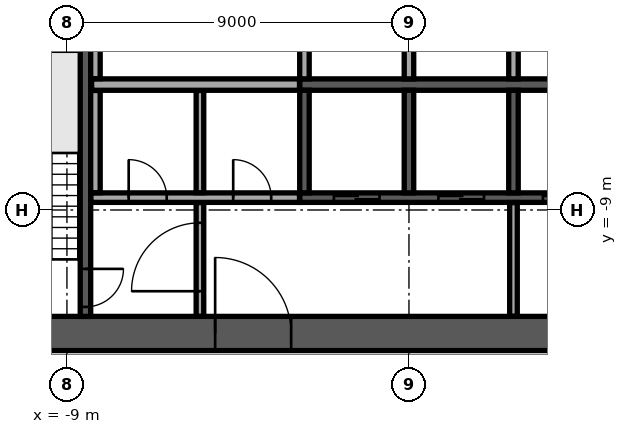
"""IFC4 building model, lengths in metres.
Left out: names, types, materials, properties, quantities, classifications, styles, units other than length and angle.
Written with IfcOpenShell. Run it as: python <this file> out.ifc"""

import sys

from ifc_helpers import new_model, si_unit, direction, frame, frame_2d, origin, place, context, subcontext, project, spatial, rectangle, extrude, element, fill, save


model = new_model("IFC4")
c1 = context("Model", 3, precision=1e-05, world=origin(), true_north=direction((0.0, 1.0)))
c2 = subcontext(c1, "Body", "Model", "MODEL_VIEW")
j1 = project(units=[si_unit("LENGTHUNIT", "METRE"), si_unit("PLANEANGLEUNIT", "RADIAN")], contexts=[c1])
p1 = place(None, origin())
s1 = spatial("IfcSite", under=j1, at=p1, CompositionType="ELEMENT")
p2 = place(p1, origin())
s2 = spatial("IfcBuilding", under=s1, at=p2, CompositionType="ELEMENT")
p3 = place(p2, frame((0.0, 0.0, 197.3)))
s3 = spatial("IfcBuildingStorey", under=s2, at=p3, CompositionType="ELEMENT", Elevation=197.3)
p4 = place(p3, frame((-12.7, -12.25, 0.0), z_axis=(0.0, 0.0, 1.0), x_axis=(1.0, 0.0, 0.0)))
e1 = element("IfcWall", 1, at=p4, inside=s3, PredefinedType="SHEAR", context=c2, shape_type="SweptSolid", body=[
    extrude(rectangle(XDim=25.4, YDim=0.9, at=frame_2d((12.7, 0.0))), origin(), (0.0, 0.0, 1.0), 3.62),
])
p5 = place(p4, frame((7.6, 0.0, 0.0)))
e2 = element("IfcOpeningElement", 2, at=p5, cuts=e1, PredefinedType="OPENING", context=c2, shape_type="SweptSolid", body=[
    extrude(rectangle(XDim=2.0, YDim=2.1, at=frame_2d((1.0, 1.05))), frame((0.0, 0.46, 0.0), z_axis=(0.0, -1.0, 0.0), x_axis=(1.0, 0.0, 0.0)), (0.0, 0.0, 1.0), 0.92),
])
p6 = place(p4, frame((17.725, 0.0, 0.0)))
e3 = element("IfcOpeningElement", 3, at=p6, cuts=e1, PredefinedType="OPENING", context=c2, shape_type="SweptSolid", body=[
    extrude(rectangle(XDim=1.2, YDim=2.1, at=frame_2d((0.6, 1.05))), frame((0.0, 0.46, 0.0), z_axis=(0.0, -1.0, 0.0), x_axis=(1.0, 0.0, 0.0)), (0.0, 0.0, 1.0), 0.92),
])
p7 = place(p4, frame((1.875, 0.0, 0.0)))
e4 = element("IfcOpeningElement", 4, at=p7, cuts=e1, PredefinedType="OPENING", context=c2, shape_type="SweptSolid", body=[
    extrude(rectangle(XDim=1.2, YDim=2.1, at=frame_2d((0.6, 1.05))), frame((0.0, 0.46, 0.0), z_axis=(0.0, -1.0, 0.0), x_axis=(1.0, 0.0, 0.0)), (0.0, 0.0, 1.0), 0.92),
])
p8 = place(p4, frame((22.325, 0.0, 0.0)))
e5 = element("IfcOpeningElement", 5, at=p8, cuts=e1, PredefinedType="OPENING", context=c2, shape_type="SweptSolid", body=[
    extrude(rectangle(XDim=1.2, YDim=2.1, at=frame_2d((0.6, 1.05))), frame((0.0, 0.46, 0.0), z_axis=(0.0, -1.0, 0.0), x_axis=(1.0, 0.0, 0.0)), (0.0, 0.0, 1.0), 0.92),
])
p9 = place(p3, frame((-2.875, -5.7, 0.0), z_axis=(0.0, 0.0, 1.0), x_axis=(1.0, 0.0, 0.0)))
e6 = element("IfcWall", 6, at=p9, inside=s3, PredefinedType="SOLIDWALL", context=c2, shape_type="SweptSolid", body=[
    extrude(rectangle(XDim=11.25, YDim=0.3, at=frame_2d((5.625, 0.0))), origin(), (0.0, 0.0, 1.0), 3.62),
])
for number, where, z_axis, x_axis in (
    (7, (-2.75, -5.55, 0.0), (0.0, 0.0, 1.0), (0.0, 1.0, 0.0)),
    (8, (0.0, -5.55, 0.0), (0.0, 0.0, 1.0), (0.0, 1.0, 0.0)),
    (9, (2.75, -5.55, 0.0), (0.0, 0.0, 1.0), (0.0, 1.0, 0.0)),
):
    element("IfcWall", number, at=place(p3, frame(where, z_axis=z_axis, x_axis=x_axis)), inside=s3, PredefinedType="SOLIDWALL", context=c2, shape_type="SweptSolid", body=[
        extrude(rectangle(XDim=2.7, YDim=0.25, at=frame_2d((1.35, 0.0))), origin(), (0.0, 0.0, 1.0), 3.62),
    ])
p10 = place(p3, frame((-2.875, -8.675, 0.0), z_axis=(0.0, 0.0, 1.0), x_axis=(1.0, 0.0, 0.0)))
e10 = element("IfcWall", 10, at=p10, inside=s3, PredefinedType="SOLIDWALL", context=c2, shape_type="SweptSolid", body=[
    extrude(rectangle(XDim=11.25, YDim=0.25, at=frame_2d((5.625, 0.0))), origin(), (0.0, 0.0, 1.0), 3.62),
])
p11 = place(p10, frame((0.9, 0.0, 0.0)))
e11 = element("IfcOpeningElement", 11, at=p11, cuts=e10, PredefinedType="OPENING", context=c2, shape_type="SweptSolid", body=[
    extrude(rectangle(XDim=1.2, YDim=2.1, at=frame_2d((0.6, 1.05))), frame((0.0, 0.135, 0.0), z_axis=(0.0, -1.0, 0.0), x_axis=(1.0, 0.0, 0.0)), (0.0, 0.0, 1.0), 0.27),
])
p12 = place(p10, frame((3.65, 0.0, 0.0)))
e12 = element("IfcOpeningElement", 12, at=p12, cuts=e10, PredefinedType="OPENING", context=c2, shape_type="SweptSolid", body=[
    extrude(rectangle(XDim=1.2, YDim=2.1, at=frame_2d((0.6, 1.05))), frame((0.0, 0.135, 0.0), z_axis=(0.0, -1.0, 0.0), x_axis=(1.0, 0.0, 0.0)), (0.0, 0.0, 1.0), 0.27),
])
p13 = place(p10, frame((6.4, 0.0, 0.0)))
e13 = element("IfcOpeningElement", 13, at=p13, cuts=e10, PredefinedType="OPENING", context=c2, shape_type="SweptSolid", body=[
    extrude(rectangle(XDim=1.2, YDim=2.1, at=frame_2d((0.6, 1.05))), frame((0.0, 0.135, 0.0), z_axis=(0.0, -1.0, 0.0), x_axis=(1.0, 0.0, 0.0)), (0.0, 0.0, 1.0), 0.27),
])
p14 = place(p10, frame((9.15, 0.0, 0.0)))
e14 = element("IfcOpeningElement", 14, at=p14, cuts=e10, PredefinedType="OPENING", context=c2, shape_type="SweptSolid", body=[
    extrude(rectangle(XDim=1.2, YDim=2.1, at=frame_2d((0.6, 1.05))), frame((0.0, 0.135, 0.0), z_axis=(0.0, -1.0, 0.0), x_axis=(1.0, 0.0, 0.0)), (0.0, 0.0, 1.0), 0.27),
])
for number, where, z_axis, x_axis in (
    (15, (-2.75, -8.55, 0.0), (0.0, 0.0, 1.0), (0.0, 1.0, 0.0)),
    (16, (0.0, -8.55, 0.0), (0.0, 0.0, 1.0), (0.0, 1.0, 0.0)),
    (17, (2.75, -8.55, 0.0), (0.0, 0.0, 1.0), (0.0, 1.0, 0.0)),
):
    element("IfcWall", number, at=place(p3, frame(where, z_axis=z_axis, x_axis=x_axis)), inside=s3, PredefinedType="SOLIDWALL", context=c2, shape_type="SweptSolid", body=[
        extrude(rectangle(XDim=2.7, YDim=0.25, at=frame_2d((1.35, 0.0))), origin(), (0.0, 0.0, 1.0), 3.62),
    ])
p15 = place(p3, frame((-8.512, -4.55, 0.0), z_axis=(0.0, 0.0, 1.0), x_axis=(0.0, -1.0, 0.0)))
e18 = element("IfcWall", 18, at=p15, inside=s3, PredefinedType="SOLIDWALL", context=c2, shape_type="SweptSolid", body=[
    extrude(rectangle(XDim=7.25, YDim=0.275, at=frame_2d((3.625, 0.0))), origin(), (0.0, 0.0, 1.0), 3.62),
])
p16 = place(p15, frame((6.0, 0.0, 0.0)))
e19 = element("IfcOpeningElement", 19, at=p16, cuts=e18, PredefinedType="OPENING", context=c2, shape_type="SweptSolid", body=[
    extrude(rectangle(XDim=1.0, YDim=2.1, at=frame_2d((0.5, 1.05))), frame((0.0, 0.147, 0.0), z_axis=(0.0, -1.0, 0.0), x_axis=(1.0, 0.0, 0.0)), (0.0, 0.0, 1.0), 0.295),
])
p17 = place(p3, frame((-5.5, -11.795, 0.0), z_axis=(0.0, 0.0, 1.0), x_axis=(0.0, 1.0, 0.0)))
e20 = element("IfcWall", 20, at=p17, inside=s3, PredefinedType="PARTITIONING", context=c2, shape_type="SweptSolid", body=[
    extrude(rectangle(XDim=2.99, YDim=0.2, at=frame_2d((1.495, 0.0))), origin(), (0.0, 0.0, 1.0), 3.62),
])
p18 = place(p17, frame((0.657, 0.0, 0.0)))
e21 = element("IfcOpeningElement", 21, at=p18, cuts=e20, PredefinedType="OPENING", context=c2, shape_type="SweptSolid", body=[
    extrude(rectangle(XDim=1.8, YDim=2.1, at=frame_2d((0.9, 1.05))), frame((0.0, 0.11, 0.0), z_axis=(0.0, -1.0, 0.0), x_axis=(1.0, 0.0, 0.0)), (0.0, 0.0, 1.0), 0.22),
])
p19 = place(p3, frame((2.75, -11.795, 0.0), z_axis=(0.0, 0.0, 1.0), x_axis=(0.0, 1.0, 0.0)))
e22 = element("IfcWall", 22, at=p19, inside=s3, PredefinedType="PARTITIONING", context=c2, shape_type="SweptSolid", body=[
    extrude(rectangle(XDim=2.99, YDim=0.2, at=frame_2d((1.495, 0.0))), origin(), (0.0, 0.0, 1.0), 3.62),
])
p20 = place(p3, frame((-8.37, -8.675, 0.0), z_axis=(0.0, 0.0, 1.0), x_axis=(1.0, 0.0, 0.0)))
e23 = element("IfcWall", 23, at=p20, inside=s3, PredefinedType="PARTITIONING", context=c2, shape_type="SweptSolid", body=[
    extrude(rectangle(XDim=5.49, YDim=0.25, at=frame_2d((2.745, 0.0))), origin(), (0.0, 0.0, 1.0), 3.62),
])
p21 = place(p20, frame((0.995, 0.0, 0.0)))
e24 = element("IfcOpeningElement", 24, at=p21, cuts=e23, PredefinedType="OPENING", context=c2, shape_type="SweptSolid", body=[
    extrude(rectangle(XDim=1.0, YDim=2.1, at=frame_2d((0.5, 1.05))), frame((0.0, 0.135, 0.0), z_axis=(0.0, -1.0, 0.0), x_axis=(1.0, 0.0, 0.0)), (0.0, 0.0, 1.0), 0.27),
])
p22 = place(p20, frame((3.745, 0.0, 0.0)))
e25 = element("IfcOpeningElement", 25, at=p22, cuts=e23, PredefinedType="OPENING", context=c2, shape_type="SweptSolid", body=[
    extrude(rectangle(XDim=1.0, YDim=2.1, at=frame_2d((0.5, 1.05))), frame((0.0, 0.135, 0.0), z_axis=(0.0, -1.0, 0.0), x_axis=(1.0, 0.0, 0.0)), (0.0, 0.0, 1.0), 0.27),
])
p23 = place(p3, frame((-8.25, -8.545, 0.0), z_axis=(0.0, 0.0, 1.0), x_axis=(0.0, 1.0, 0.0)))
e26 = element("IfcWall", 26, at=p23, inside=s3, PredefinedType="PARTITIONING", context=c2, shape_type="SweptSolid", body=[
    extrude(rectangle(XDim=2.69, YDim=0.25, at=frame_2d((1.345, 0.0))), origin(), (0.0, 0.0, 1.0), 3.62),
])
p24 = place(p3, frame((-5.5, -8.545, 0.0), z_axis=(0.0, 0.0, 1.0), x_axis=(0.0, 1.0, 0.0)))
e27 = element("IfcWall", 27, at=p24, inside=s3, PredefinedType="PARTITIONING", context=c2, shape_type="SweptSolid", body=[
    extrude(rectangle(XDim=2.69, YDim=0.2, at=frame_2d((1.345, 0.0))), origin(), (0.0, 0.0, 1.0), 3.62),
])
p25 = place(p3, frame((-8.35, -5.7, 0.0), z_axis=(0.0, 0.0, 1.0), x_axis=(1.0, 0.0, 0.0)))
e28 = element("IfcWall", 28, at=p25, inside=s3, PredefinedType="PARTITIONING", context=c2, shape_type="SweptSolid", body=[
    extrude(rectangle(XDim=5.47, YDim=0.3, at=frame_2d((2.735, 0.0))), origin(), (0.0, 0.0, 1.0), 3.62),
])
p26 = place(p3, frame((-8.25, -5.545, 0.0), z_axis=(0.0, 0.0, 1.0), x_axis=(0.0, 1.0, 0.0)))
e29 = element("IfcWall", 29, at=p26, inside=s3, PredefinedType="PARTITIONING", context=c2, shape_type="SweptSolid", body=[
    extrude(rectangle(XDim=2.69, YDim=0.25, at=frame_2d((1.345, 0.0))), origin(), (0.0, 0.0, 1.0), 3.62),
])
p27 = place(p3, frame((-35.02, -5.994, 0.0), z_axis=(0.0, 0.0, 1.0), x_axis=(0.682002361324, -0.731349970362, 0.0)))
e30 = element("IfcWall", 30, at=p27, inside=s3, PredefinedType="STANDARD", context=c2, shape_type="SweptSolid", body=[
    extrude(rectangle(XDim=39.0, YDim=0.6, at=frame_2d((19.5, 0.0))), origin(), (0.0, 0.0, 1.0), 3.62),
])
p28 = place(p27, frame((1.217, 0.0, 0.9)))
e31 = element("IfcOpeningElement", 31, at=p28, cuts=e30, PredefinedType="OPENING", context=c2, shape_type="SweptSolid", body=[
    extrude(rectangle(XDim=1.9, YDim=2.1, at=frame_2d((0.95, 1.05))), frame((0.0, 0.31, 0.0), z_axis=(0.0, -1.0, 0.0), x_axis=(1.0, 0.0, 0.0)), (0.0, 0.0, 1.0), 0.62),
])
p29 = place(p27, frame((5.55, 0.0, 0.9)))
e32 = element("IfcOpeningElement", 32, at=p29, cuts=e30, PredefinedType="OPENING", context=c2, shape_type="SweptSolid", body=[
    extrude(rectangle(XDim=1.9, YDim=2.1, at=frame_2d((0.95, 1.05))), frame((0.0, 0.31, 0.0), z_axis=(0.0, -1.0, 0.0), x_axis=(1.0, 0.0, 0.0)), (0.0, 0.0, 1.0), 0.62),
])
p30 = place(p27, frame((9.883, 0.0, 0.9)))
e33 = element("IfcOpeningElement", 33, at=p30, cuts=e30, PredefinedType="OPENING", context=c2, shape_type="SweptSolid", body=[
    extrude(rectangle(XDim=1.9, YDim=2.1, at=frame_2d((0.95, 1.05))), frame((0.0, 0.31, 0.0), z_axis=(0.0, -1.0, 0.0), x_axis=(1.0, 0.0, 0.0)), (0.0, 0.0, 1.0), 0.62),
])
p31 = place(p27, frame((14.217, 0.0, 0.9)))
e34 = element("IfcOpeningElement", 34, at=p31, cuts=e30, PredefinedType="OPENING", context=c2, shape_type="SweptSolid", body=[
    extrude(rectangle(XDim=1.9, YDim=2.1, at=frame_2d((0.95, 1.05))), frame((0.0, 0.31, 0.0), z_axis=(0.0, -1.0, 0.0), x_axis=(1.0, 0.0, 0.0)), (0.0, 0.0, 1.0), 0.62),
])
p32 = place(p27, frame((18.55, 0.0, 0.9)))
e35 = element("IfcOpeningElement", 35, at=p32, cuts=e30, PredefinedType="OPENING", context=c2, shape_type="SweptSolid", body=[
    extrude(rectangle(XDim=1.9, YDim=2.1, at=frame_2d((0.95, 1.05))), frame((0.0, 0.31, 0.0), z_axis=(0.0, -1.0, 0.0), x_axis=(1.0, 0.0, 0.0)), (0.0, 0.0, 1.0), 0.62),
])
p33 = place(p27, frame((22.883, 0.0, 0.9)))
e36 = element("IfcOpeningElement", 36, at=p33, cuts=e30, PredefinedType="OPENING", context=c2, shape_type="SweptSolid", body=[
    extrude(rectangle(XDim=1.9, YDim=2.1, at=frame_2d((0.95, 1.05))), frame((0.0, 0.31, 0.0), z_axis=(0.0, -1.0, 0.0), x_axis=(1.0, 0.0, 0.0)), (0.0, 0.0, 1.0), 0.62),
])
p34 = place(p27, frame((27.217, 0.0, 0.9)))
e37 = element("IfcOpeningElement", 37, at=p34, cuts=e30, PredefinedType="OPENING", context=c2, shape_type="SweptSolid", body=[
    extrude(rectangle(XDim=1.9, YDim=2.1, at=frame_2d((0.95, 1.05))), frame((0.0, 0.31, 0.0), z_axis=(0.0, -1.0, 0.0), x_axis=(1.0, 0.0, 0.0)), (0.0, 0.0, 1.0), 0.62),
])
p35 = place(p27, frame((31.55, 0.0, 0.9)))
e38 = element("IfcOpeningElement", 38, at=p35, cuts=e30, PredefinedType="OPENING", context=c2, shape_type="SweptSolid", body=[
    extrude(rectangle(XDim=1.9, YDim=2.1, at=frame_2d((0.95, 1.05))), frame((0.0, 0.31, 0.0), z_axis=(0.0, -1.0, 0.0), x_axis=(1.0, 0.0, 0.0)), (0.0, 0.0, 1.0), 0.62),
])
p36 = place(p27, frame((35.883, 0.0, 0.9)))
e39 = element("IfcOpeningElement", 39, at=p36, cuts=e30, PredefinedType="OPENING", context=c2, shape_type="SweptSolid", body=[
    extrude(rectangle(XDim=1.9, YDim=2.1, at=frame_2d((0.95, 1.05))), frame((0.0, 0.31, 0.0), z_axis=(0.0, -1.0, 0.0), x_axis=(1.0, 0.0, 0.0)), (0.0, 0.0, 1.0), 0.62),
])
p37 = place(p3, frame((-1.073, -34.773, 0.0), z_axis=(0.0, 0.0, 1.0), x_axis=(0.731351780381, 0.682000420333, 0.0)))
e40 = element("IfcWall", 40, at=p37, inside=s3, PredefinedType="STANDARD", context=c2, shape_type="SweptSolid", body=[
    extrude(rectangle(XDim=49.0, YDim=0.6, at=frame_2d((24.5, 0.0))), origin(), (0.0, 0.0, 1.0), 3.62),
])
p38 = place(p37, frame((1.227, 0.0, 0.9)))
e41 = element("IfcOpeningElement", 41, at=p38, cuts=e40, PredefinedType="OPENING", context=c2, shape_type="SweptSolid", body=[
    extrude(rectangle(XDim=2.0, YDim=2.1, at=frame_2d((1.0, 1.05))), frame((0.0, 0.31, 0.0), z_axis=(0.0, -1.0, 0.0), x_axis=(1.0, 0.0, 0.0)), (0.0, 0.0, 1.0), 0.62),
])
p39 = place(p37, frame((5.682, 0.0, 0.9)))
e42 = element("IfcOpeningElement", 42, at=p39, cuts=e40, PredefinedType="OPENING", context=c2, shape_type="SweptSolid", body=[
    extrude(rectangle(XDim=2.0, YDim=2.1, at=frame_2d((1.0, 1.05))), frame((0.0, 0.31, 0.0), z_axis=(0.0, -1.0, 0.0), x_axis=(1.0, 0.0, 0.0)), (0.0, 0.0, 1.0), 0.62),
])
p40 = place(p37, frame((14.591, 0.0, 0.9)))
e43 = element("IfcOpeningElement", 43, at=p40, cuts=e40, PredefinedType="OPENING", context=c2, shape_type="SweptSolid", body=[
    extrude(rectangle(XDim=2.0, YDim=2.1, at=frame_2d((1.0, 1.05))), frame((0.0, 0.31, 0.0), z_axis=(0.0, -1.0, 0.0), x_axis=(1.0, 0.0, 0.0)), (0.0, 0.0, 1.0), 0.62),
])
p41 = place(p37, frame((19.045, 0.0, 0.9)))
e44 = element("IfcOpeningElement", 44, at=p41, cuts=e40, PredefinedType="OPENING", context=c2, shape_type="SweptSolid", body=[
    extrude(rectangle(XDim=2.0, YDim=2.1, at=frame_2d((1.0, 1.05))), frame((0.0, 0.31, 0.0), z_axis=(0.0, -1.0, 0.0), x_axis=(1.0, 0.0, 0.0)), (0.0, 0.0, 1.0), 0.62),
])
p42 = place(p37, frame((23.5, 0.0, 0.9)))
e45 = element("IfcOpeningElement", 45, at=p42, cuts=e40, PredefinedType="OPENING", context=c2, shape_type="SweptSolid", body=[
    extrude(rectangle(XDim=2.0, YDim=2.1, at=frame_2d((1.0, 1.05))), frame((0.0, 0.31, 0.0), z_axis=(0.0, -1.0, 0.0), x_axis=(1.0, 0.0, 0.0)), (0.0, 0.0, 1.0), 0.62),
])
p43 = place(p37, frame((27.955, 0.0, 0.9)))
e46 = element("IfcOpeningElement", 46, at=p43, cuts=e40, PredefinedType="OPENING", context=c2, shape_type="SweptSolid", body=[
    extrude(rectangle(XDim=2.0, YDim=2.1, at=frame_2d((1.0, 1.05))), frame((0.0, 0.31, 0.0), z_axis=(0.0, -1.0, 0.0), x_axis=(1.0, 0.0, 0.0)), (0.0, 0.0, 1.0), 0.62),
])
p44 = place(p37, frame((32.409, 0.0, 0.9)))
e47 = element("IfcOpeningElement", 47, at=p44, cuts=e40, PredefinedType="OPENING", context=c2, shape_type="SweptSolid", body=[
    extrude(rectangle(XDim=2.0, YDim=2.1, at=frame_2d((1.0, 1.05))), frame((0.0, 0.31, 0.0), z_axis=(0.0, -1.0, 0.0), x_axis=(1.0, 0.0, 0.0)), (0.0, 0.0, 1.0), 0.62),
])
p45 = place(p37, frame((36.864, 0.0, 0.9)))
e48 = element("IfcOpeningElement", 48, at=p45, cuts=e40, PredefinedType="OPENING", context=c2, shape_type="SweptSolid", body=[
    extrude(rectangle(XDim=2.0, YDim=2.1, at=frame_2d((1.0, 1.05))), frame((0.0, 0.31, 0.0), z_axis=(0.0, -1.0, 0.0), x_axis=(1.0, 0.0, 0.0)), (0.0, 0.0, 1.0), 0.62),
])
p46 = place(p37, frame((41.318, 0.0, 0.9)))
e49 = element("IfcOpeningElement", 49, at=p46, cuts=e40, PredefinedType="OPENING", context=c2, shape_type="SweptSolid", body=[
    extrude(rectangle(XDim=2.0, YDim=2.1, at=frame_2d((1.0, 1.05))), frame((0.0, 0.31, 0.0), z_axis=(0.0, -1.0, 0.0), x_axis=(1.0, 0.0, 0.0)), (0.0, 0.0, 1.0), 0.62),
])
p47 = place(p37, frame((45.773, 0.0, 0.9)))
e50 = element("IfcOpeningElement", 50, at=p47, cuts=e40, PredefinedType="OPENING", context=c2, shape_type="SweptSolid", body=[
    extrude(rectangle(XDim=2.0, YDim=2.1, at=frame_2d((1.0, 1.05))), frame((0.0, 0.31, 0.0), z_axis=(0.0, -1.0, 0.0), x_axis=(1.0, 0.0, 0.0)), (0.0, 0.0, 1.0), 0.62),
])
p48 = place(p3, frame((-23.582, -6.907, 0.0), z_axis=(0.0, 0.0, 1.0), x_axis=(0.68201130552, -0.73134162957, 0.0)))
e51 = element("IfcWall", 51, at=p48, inside=s3, PredefinedType="PARTITIONING", context=c2, shape_type="SweptSolid", body=[
    extrude(rectangle(XDim=22.137, YDim=0.15, at=frame_2d((11.069, 0.0))), origin(), (0.0, 0.0, 1.0), 3.17),
])
p49 = place(p48, frame((10.953, 0.0, 0.0)))
e52 = element("IfcOpeningElement", 52, at=p49, cuts=e51, PredefinedType="OPENING", context=c2, shape_type="SweptSolid", body=[
    extrude(rectangle(XDim=1.0, YDim=2.1, at=frame_2d((0.5, 1.05))), frame((0.0, 0.085, 0.0), z_axis=(0.0, -1.0, 0.0), x_axis=(1.0, 0.0, 0.0)), (0.0, 0.0, 1.0), 0.17),
])
p50 = place(p3, frame((1.576, -24.793, 0.0), z_axis=(0.0, 0.0, 1.0), x_axis=(0.731351215564, 0.68200102602, 0.0)))
e53 = element("IfcWall", 53, at=p50, inside=s3, PredefinedType="PARTITIONING", context=c2, shape_type="SweptSolid", body=[
    extrude(rectangle(XDim=31.513, YDim=0.15, at=frame_2d((15.757, 0.0))), origin(), (0.0, 0.0, 1.0), 3.17),
])
p51 = place(p50, frame((2.3, 0.0, 0.0)))
e54 = element("IfcOpeningElement", 54, at=p51, cuts=e53, PredefinedType="OPENING", context=c2, shape_type="SweptSolid", body=[
    extrude(rectangle(XDim=1.8, YDim=2.1, at=frame_2d((0.9, 1.05))), frame((0.0, 0.085, 0.0), z_axis=(0.0, -1.0, 0.0), x_axis=(1.0, 0.0, 0.0)), (0.0, 0.0, 1.0), 0.17),
])
p52 = place(p50, frame((11.883, 0.0, 0.0)))
e55 = element("IfcOpeningElement", 55, at=p52, cuts=e53, PredefinedType="OPENING", context=c2, shape_type="SweptSolid", body=[
    extrude(rectangle(XDim=1.0, YDim=2.1, at=frame_2d((0.5, 1.05))), frame((0.0, 0.085, 0.0), z_axis=(0.0, -1.0, 0.0), x_axis=(1.0, 0.0, 0.0)), (0.0, 0.0, 1.0), 0.17),
])
p53 = place(p50, frame((15.726, 0.0, 0.0)))
e56 = element("IfcOpeningElement", 56, at=p53, cuts=e53, PredefinedType="OPENING", context=c2, shape_type="SweptSolid", body=[
    extrude(rectangle(XDim=1.0, YDim=2.1, at=frame_2d((0.5, 1.05))), frame((0.0, 0.085, 0.0), z_axis=(0.0, -1.0, 0.0), x_axis=(1.0, 0.0, 0.0)), (0.0, 0.0, 1.0), 0.17),
])
p54 = place(p5, origin())
e57 = element("IfcDoor", 57, at=p54, inside=s3, OperationType="SINGLE_SWING_LEFT", PredefinedType="DOOR", context=c2, shape_type="SweptSolid", body=[
    extrude(rectangle(XDim=2.0, YDim=2.1, at=frame_2d((1.0, 1.05))), frame((0.0, 0.025, 0.0), z_axis=(0.0, -1.0, 0.0), x_axis=(1.0, 0.0, 0.0)), (0.0, 0.0, 1.0), 0.05),
])
fill(e2, e57)
p55 = place(p11, origin())
e58 = element("IfcDoor", 58, at=p55, inside=s3, OperationType="DOUBLE_DOOR_SLIDING", PredefinedType="DOOR", context=c2, shape_type="SweptSolid", body=[
    extrude(rectangle(XDim=1.2, YDim=2.1, at=frame_2d((0.6, 1.05))), frame((0.0, 0.025, 0.0), z_axis=(0.0, -1.0, 0.0), x_axis=(1.0, 0.0, 0.0)), (0.0, 0.0, 1.0), 0.05),
])
fill(e11, e58)
p56 = place(p12, origin())
e59 = element("IfcDoor", 59, at=p56, inside=s3, OperationType="DOUBLE_DOOR_SLIDING", PredefinedType="DOOR", context=c2, shape_type="SweptSolid", body=[
    extrude(rectangle(XDim=1.2, YDim=2.1, at=frame_2d((0.6, 1.05))), frame((0.0, 0.025, 0.0), z_axis=(0.0, -1.0, 0.0), x_axis=(1.0, 0.0, 0.0)), (0.0, 0.0, 1.0), 0.05),
])
fill(e12, e59)
p57 = place(p13, origin())
e60 = element("IfcDoor", 60, at=p57, inside=s3, OperationType="DOUBLE_DOOR_SLIDING", PredefinedType="DOOR", context=c2, shape_type="SweptSolid", body=[
    extrude(rectangle(XDim=1.2, YDim=2.1, at=frame_2d((0.6, 1.05))), frame((0.0, 0.025, 0.0), z_axis=(0.0, -1.0, 0.0), x_axis=(1.0, 0.0, 0.0)), (0.0, 0.0, 1.0), 0.05),
])
fill(e13, e60)
p58 = place(p16, origin())
e61 = element("IfcDoor", 61, at=p58, inside=s3, OperationType="SINGLE_SWING_LEFT", PredefinedType="DOOR", context=c2, shape_type="SweptSolid", body=[
    extrude(rectangle(XDim=1.0, YDim=2.1, at=frame_2d((0.5, 1.05))), frame((0.0, 0.025, 0.0), z_axis=(0.0, -1.0, 0.0), x_axis=(1.0, 0.0, 0.0)), (0.0, 0.0, 1.0), 0.05),
])
fill(e19, e61)
p59 = place(p21, origin())
e62 = element("IfcDoor", 62, at=p59, inside=s3, OperationType="SINGLE_SWING_LEFT", PredefinedType="DOOR", context=c2, shape_type="SweptSolid", body=[
    extrude(rectangle(XDim=1.0, YDim=2.1, at=frame_2d((0.5, 1.05))), frame((0.0, 0.025, 0.0), z_axis=(0.0, -1.0, 0.0), x_axis=(1.0, 0.0, 0.0)), (0.0, 0.0, 1.0), 0.05),
])
fill(e24, e62)
p60 = place(p22, origin())
e63 = element("IfcDoor", 63, at=p60, inside=s3, OperationType="SINGLE_SWING_LEFT", PredefinedType="DOOR", context=c2, shape_type="SweptSolid", body=[
    extrude(rectangle(XDim=1.0, YDim=2.1, at=frame_2d((0.5, 1.05))), frame((0.0, 0.025, 0.0), z_axis=(0.0, -1.0, 0.0), x_axis=(1.0, 0.0, 0.0)), (0.0, 0.0, 1.0), 0.05),
])
fill(e25, e63)
p61 = place(p18, origin())
e64 = element("IfcDoor", 64, at=p61, inside=s3, OperationType="SINGLE_SWING_LEFT", PredefinedType="DOOR", context=c2, shape_type="SweptSolid", body=[
    extrude(rectangle(XDim=1.8, YDim=2.1, at=frame_2d((0.9, 1.05))), frame((0.0, 0.025, 0.0), z_axis=(0.0, -1.0, 0.0), x_axis=(1.0, 0.0, 0.0)), (0.0, 0.0, 1.0), 0.05),
])
fill(e21, e64)
save(model, sys.argv[1])
